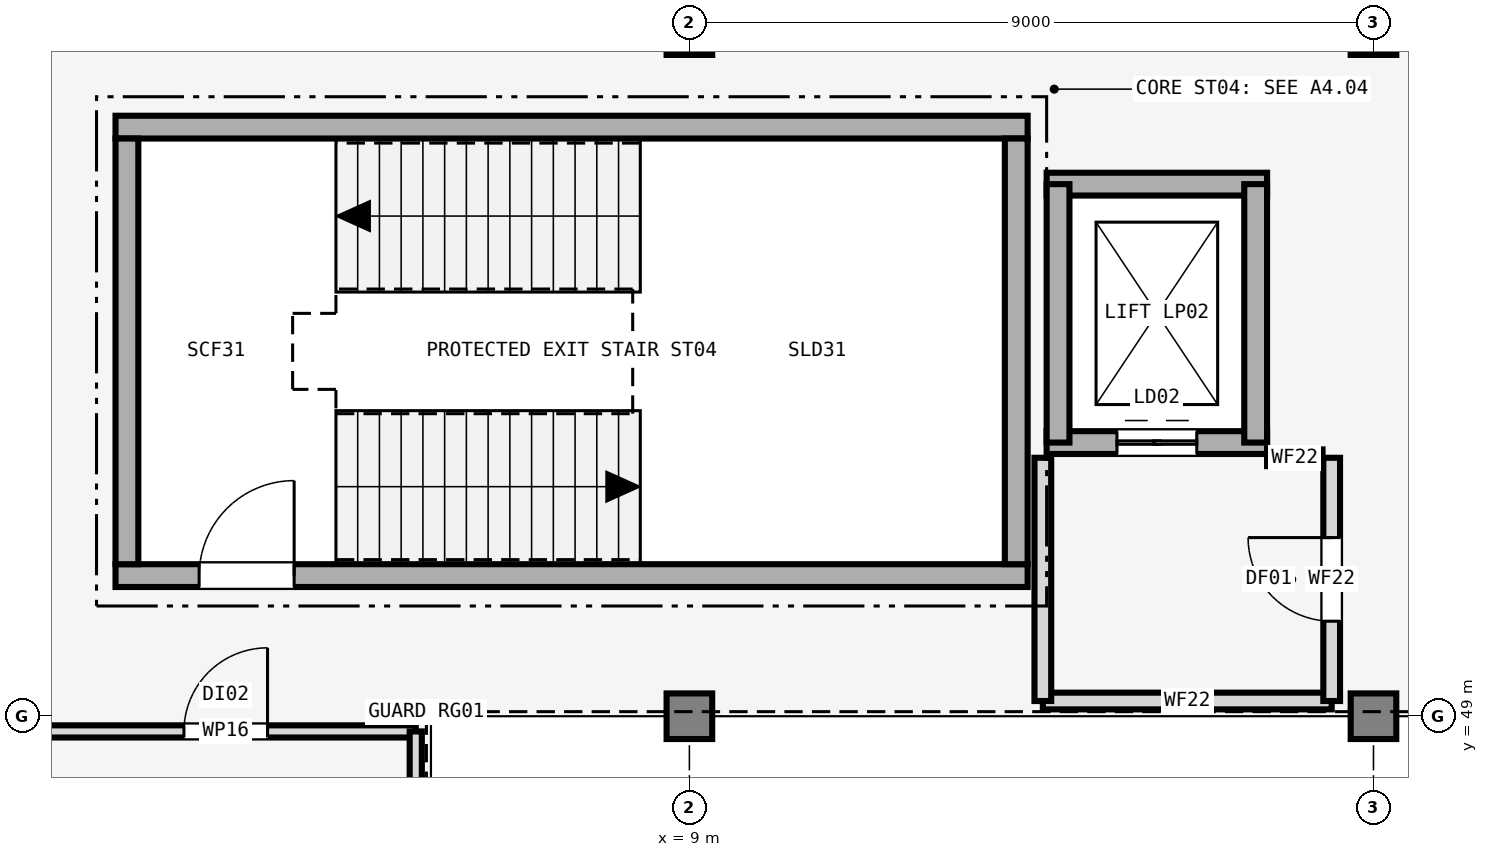
"""IFC4 building model, lengths in metres.
Left out: names, types, materials, properties, quantities, classifications, styles, units other than length and angle.
Written with IfcOpenShell. Run it as: python <this file> out.ifc"""

import sys

from ifc_helpers import new_model, si_unit, direction, frame, frame_2d, origin, origin_2d, place, context, subcontext, project, spatial, rectangle, extrude, element, fill, save


model = new_model("IFC4")
c1 = context("Model", 3, precision=1e-05, world=origin(), true_north=direction((0.0, 1.0)))
c2 = subcontext(c1, "Body", "Model", "MODEL_VIEW")
j1 = project(units=[si_unit("LENGTHUNIT", "METRE"), si_unit("PLANEANGLEUNIT", "RADIAN")], contexts=[c1])
p1 = place(None, origin())
s1 = spatial("IfcSite", under=j1, at=p1, CompositionType="ELEMENT")
p2 = place(p1, origin())
s2 = spatial("IfcBuilding", under=s1, at=p2, CompositionType="ELEMENT")
p3 = place(p2, frame((0.0, 0.0, 4.8)))
s3 = spatial("IfcBuildingStorey", under=s2, at=p3, CompositionType="ELEMENT", Elevation=4.8)
for number, where, z_axis, x_axis in (
    (1, (9.0, 49.0, 0.0), (0.0, 0.0, 1.0), (1.0, 0.0, 0.0)),
    (2, (9.0, 58.0, 0.0), (0.0, 0.0, 1.0), (1.0, 0.0, 0.0)),
    (3, (18.0, 49.0, 0.0), (0.0, 0.0, 1.0), (1.0, 0.0, 0.0)),
    (4, (18.0, 58.0, 0.0), (0.0, 0.0, 1.0), (1.0, 0.0, 0.0)),
):
    element("IfcColumn", number, at=place(p3, frame(where, z_axis=z_axis, x_axis=x_axis)), inside=s3, PredefinedType="COLUMN", context=c2, shape_type="SweptSolid", body=[
        extrude(rectangle(XDim=0.6, YDim=0.6, at=origin_2d()), origin(), (0.0, 0.0, 1.0), 4.5),
    ])
p4 = place(p3, frame((1.45, 50.85, 0.0), z_axis=(0.0, 0.0, 1.0), x_axis=(1.0, 0.0, 0.0)))
e5 = element("IfcWall", 5, at=p4, inside=s3, PredefinedType="SHEAR", context=c2, shape_type="SweptSolid", body=[
    extrude(rectangle(XDim=12.0, YDim=0.3, at=frame_2d((6.0, 0.0))), origin(), (0.0, 0.0, 1.0), 4.5),
])
p5 = place(p4, frame((1.1, 0.0, 0.0)))
e6 = element("IfcOpeningElement", 6, at=p5, cuts=e5, PredefinedType="OPENING", context=c2, shape_type="SweptSolid", body=[
    extrude(rectangle(XDim=1.25, YDim=2.15, at=frame_2d((0.625, 1.075))), frame((0.0, 0.16, 0.0), z_axis=(0.0, -1.0, 0.0), x_axis=(1.0, 0.0, 0.0)), (0.0, 0.0, 1.0), 0.32),
])
p6 = place(p3, frame((13.45, 56.75, 0.0), z_axis=(0.0, 0.0, 1.0), x_axis=(-1.0, 0.0, 0.0)))
e7 = element("IfcWall", 7, at=p6, inside=s3, PredefinedType="SHEAR", context=c2, shape_type="SweptSolid", body=[
    extrude(rectangle(XDim=12.0, YDim=0.3, at=frame_2d((6.0, 0.0))), origin(), (0.0, 0.0, 1.0), 4.5),
])
for number, where, z_axis, x_axis in (
    (8, (1.6, 56.6, 0.0), (0.0, 0.0, 1.0), (0.0, -1.0, 0.0)),
    (9, (13.3, 51.0, 0.0), (0.0, 0.0, 1.0), (0.0, 1.0, 0.0)),
):
    element("IfcWall", number, at=place(p3, frame(where, z_axis=z_axis, x_axis=x_axis)), inside=s3, PredefinedType="SHEAR", context=c2, shape_type="SweptSolid", body=[
        extrude(rectangle(XDim=5.6, YDim=0.3, at=frame_2d((2.8, 0.0))), origin(), (0.0, 0.0, 1.0), 4.5),
    ])
p7 = place(p3, frame((13.7, 52.6, 0.0), z_axis=(0.0, 0.0, 1.0), x_axis=(1.0, 0.0, 0.0)))
e10 = element("IfcWall", 10, at=p7, inside=s3, PredefinedType="SHEAR", context=c2, shape_type="SweptSolid", body=[
    extrude(rectangle(XDim=2.9, YDim=0.3, at=frame_2d((1.45, 0.0))), origin(), (0.0, 0.0, 1.0), 4.5),
])
p8 = place(p7, frame((0.925, 0.0, 0.0)))
e11 = element("IfcOpeningElement", 11, at=p8, cuts=e10, PredefinedType="OPENING", context=c2, shape_type="SweptSolid", body=[
    extrude(rectangle(XDim=1.05, YDim=2.15, at=frame_2d((0.525, 1.075))), frame((0.0, 0.16, 0.0), z_axis=(0.0, -1.0, 0.0), x_axis=(1.0, 0.0, 0.0)), (0.0, 0.0, 1.0), 0.32),
])
p9 = place(p3, frame((16.6, 56.0, 0.0), z_axis=(0.0, 0.0, 1.0), x_axis=(-1.0, 0.0, 0.0)))
e12 = element("IfcWall", 12, at=p9, inside=s3, PredefinedType="SHEAR", context=c2, shape_type="SweptSolid", body=[
    extrude(rectangle(XDim=2.9, YDim=0.3, at=frame_2d((1.45, 0.0))), origin(), (0.0, 0.0, 1.0), 4.5),
])
for number, where, z_axis, x_axis in (
    (13, (13.85, 56.0, 0.0), (0.0, 0.0, 1.0), (0.0, -1.0, 0.0)),
    (14, (16.45, 52.6, 0.0), (0.0, 0.0, 1.0), (0.0, 1.0, 0.0)),
):
    element("IfcWall", number, at=place(p3, frame(where, z_axis=z_axis, x_axis=x_axis)), inside=s3, PredefinedType="SHEAR", context=c2, shape_type="SweptSolid", body=[
        extrude(rectangle(XDim=3.4, YDim=0.3, at=frame_2d((1.7, 0.0))), origin(), (0.0, 0.0, 1.0), 4.5),
    ])
p10 = place(p3, frame((13.65, 49.2, 0.0), z_axis=(0.0, 0.0, 1.0), x_axis=(1.0, 0.0, 0.0)))
e15 = element("IfcWall", 15, at=p10, inside=s3, PredefinedType="SOLIDWALL", context=c2, shape_type="SweptSolid", body=[
    extrude(rectangle(XDim=3.8, YDim=0.22, at=frame_2d((1.9, 0.0))), origin(), (0.0, 0.0, 1.0), 3.4),
])
p11 = place(p3, frame((13.65, 49.2, 0.0), z_axis=(0.0, 0.0, 1.0), x_axis=(0.0, 1.0, 0.0)))
e16 = element("IfcWall", 16, at=p11, inside=s3, PredefinedType="SOLIDWALL", context=c2, shape_type="SweptSolid", body=[
    extrude(rectangle(XDim=3.2, YDim=0.22, at=frame_2d((1.6, 0.0))), origin(), (0.0, 0.0, 1.0), 3.4),
])
p12 = place(p3, frame((17.45, 49.2, 0.0), z_axis=(0.0, 0.0, 1.0), x_axis=(0.0, 1.0, 0.0)))
e17 = element("IfcWall", 17, at=p12, inside=s3, PredefinedType="SOLIDWALL", context=c2, shape_type="SweptSolid", body=[
    extrude(rectangle(XDim=3.2, YDim=0.22, at=frame_2d((1.6, 0.0))), origin(), (0.0, 0.0, 1.0), 3.4),
])
p13 = place(p12, frame((1.05, 0.0, 0.0)))
e18 = element("IfcOpeningElement", 18, at=p13, cuts=e17, PredefinedType="OPENING", context=c2, shape_type="SweptSolid", body=[
    extrude(rectangle(XDim=1.1, YDim=2.15, at=frame_2d((0.55, 1.075))), frame((0.0, 0.12, 0.0), z_axis=(0.0, -1.0, 0.0), x_axis=(1.0, 0.0, 0.0)), (0.0, 0.0, 1.0), 0.24),
])
p14 = place(p3, frame((16.6, 52.4, 0.0), z_axis=(0.0, 0.0, 1.0), x_axis=(1.0, 0.0, 0.0)))
e19 = element("IfcWall", 19, at=p14, inside=s3, PredefinedType="SOLIDWALL", context=c2, shape_type="SweptSolid", body=[
    extrude(rectangle(XDim=0.73, YDim=0.22, at=frame_2d((0.365, 0.0))), origin(), (0.0, 0.0, 1.0), 3.4),
])
p15 = place(p3, frame((0.4, 48.8, 0.0), z_axis=(0.0, 0.0, 1.0), x_axis=(1.0, 0.0, 0.0)))
e20 = element("IfcWall", 20, at=p15, inside=s3, PredefinedType="PARTITIONING", context=c2, shape_type="SweptSolid", body=[
    extrude(rectangle(XDim=5.0, YDim=0.16, at=frame_2d((2.5, 0.0))), origin(), (0.0, 0.0, 1.0), 3.4),
])
p16 = place(p15, frame((1.95, 0.0, 0.0)))
e21 = element("IfcOpeningElement", 21, at=p16, cuts=e20, PredefinedType="OPENING", context=c2, shape_type="SweptSolid", body=[
    extrude(rectangle(XDim=1.1, YDim=2.1, at=frame_2d((0.55, 1.05))), frame((0.0, 0.09, 0.0), z_axis=(0.0, -1.0, 0.0), x_axis=(1.0, 0.0, 0.0)), (0.0, 0.0, 1.0), 0.18),
])
p17 = place(p3, frame((5.4, 48.8, 0.0), z_axis=(0.0, 0.0, 1.0), x_axis=(0.0, -1.0, 0.0)))
e22 = element("IfcWall", 22, at=p17, inside=s3, PredefinedType="PARTITIONING", context=c2, shape_type="SweptSolid", body=[
    extrude(rectangle(XDim=26.65, YDim=0.16, at=frame_2d((13.325, 0.0))), origin(), (0.0, 0.0, 1.0), 3.305),
])
p18 = place(p5, origin())
e23 = element("IfcDoor", 23, at=p18, inside=s3, OperationType="SINGLE_SWING_RIGHT", PredefinedType="DOOR", context=c2, shape_type="SweptSolid", body=[
    extrude(rectangle(XDim=1.25, YDim=2.15, at=frame_2d((0.625, 1.075))), frame((0.0, 0.025, 0.0), z_axis=(0.0, -1.0, 0.0), x_axis=(1.0, 0.0, 0.0)), (0.0, 0.0, 1.0), 0.05),
])
fill(e6, e23)
p19 = place(p8, origin())
e24 = element("IfcDoor", 24, at=p19, inside=s3, OperationType="DOUBLE_DOOR_SLIDING", PredefinedType="DOOR", context=c2, shape_type="SweptSolid", body=[
    extrude(rectangle(XDim=1.05, YDim=2.15, at=frame_2d((0.525, 1.075))), frame((0.0, 0.025, 0.0), z_axis=(0.0, -1.0, 0.0), x_axis=(1.0, 0.0, 0.0)), (0.0, 0.0, 1.0), 0.05),
])
fill(e11, e24)
p20 = place(p13, origin())
e25 = element("IfcDoor", 25, at=p20, inside=s3, OperationType="SINGLE_SWING_RIGHT", PredefinedType="DOOR", context=c2, shape_type="SweptSolid", body=[
    extrude(rectangle(XDim=1.1, YDim=2.15, at=frame_2d((0.55, 1.075))), frame((0.0, 0.025, 0.0), z_axis=(0.0, -1.0, 0.0), x_axis=(1.0, 0.0, 0.0)), (0.0, 0.0, 1.0), 0.05),
])
fill(e18, e25)
p21 = place(p16, origin())
e26 = element("IfcDoor", 26, at=p21, inside=s3, OperationType="SINGLE_SWING_RIGHT", PredefinedType="DOOR", context=c2, shape_type="SweptSolid", body=[
    extrude(rectangle(XDim=1.1, YDim=2.1, at=frame_2d((0.55, 1.05))), frame((0.0, 0.025, 0.0), z_axis=(0.0, -1.0, 0.0), x_axis=(1.0, 0.0, 0.0)), (0.0, 0.0, 1.0), 0.05),
])
fill(e21, e26)
save(model, sys.argv[1])
